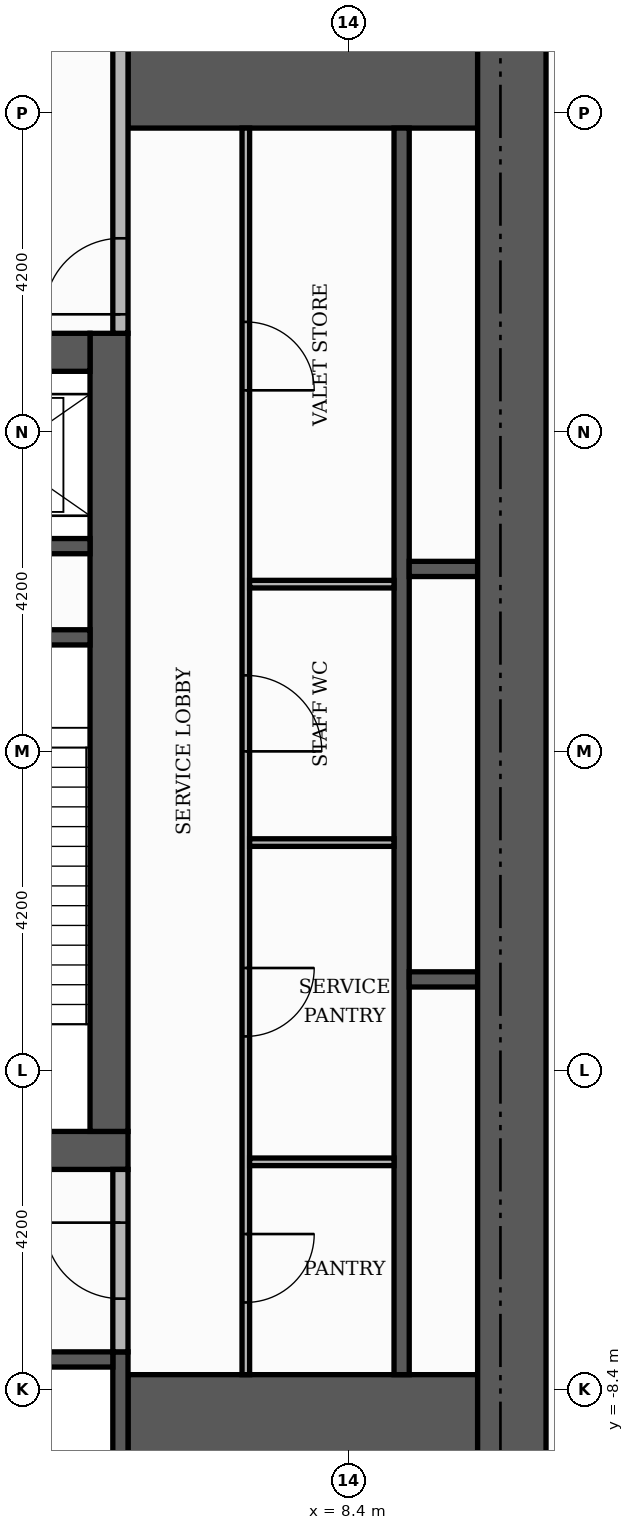
"""IFC4 building model, lengths in metres.
Left out: names, types, materials, properties, quantities, classifications, styles, units other than length and angle.
Written with IfcOpenShell. Run it as: python <this file> out.ifc"""

import sys

from ifc_helpers import new_model, si_unit, direction, frame, frame_2d, origin, place, context, subcontext, project, spatial, rectangle, extrude, element, fill, save


model = new_model("IFC4")
c1 = context("Model", 3, precision=1e-05, world=origin(), true_north=direction((0.0, 1.0)))
c2 = subcontext(c1, "Body", "Model", "MODEL_VIEW")
j1 = project(units=[si_unit("LENGTHUNIT", "METRE"), si_unit("PLANEANGLEUNIT", "RADIAN")], contexts=[c1])
p1 = place(None, origin())
s1 = spatial("IfcSite", under=j1, at=p1, CompositionType="ELEMENT")
p2 = place(p1, origin())
s2 = spatial("IfcBuilding", under=s1, at=p2, CompositionType="ELEMENT")
p3 = place(p2, frame((0.0, 0.0, 73.8)))
s3 = spatial("IfcBuildingStorey", under=s2, at=p3, CompositionType="ELEMENT", Elevation=73.8)
p4 = place(p3, frame((-5.5, -5.25, 0.0), z_axis=(0.0, 0.0, 1.0), x_axis=(1.0, 0.0, 0.0)))
e1 = element("IfcWall", 1, at=p4, inside=s3, PredefinedType="SHEAR", context=c2, shape_type="SweptSolid", body=[
    extrude(rectangle(XDim=11.0, YDim=0.5, at=frame_2d((5.5, 0.0))), origin(), (0.0, 0.0, 1.0), 4.98),
])
p5 = place(p4, frame((4.9, 0.0, 0.0)))
e2 = element("IfcOpeningElement", 2, at=p5, cuts=e1, PredefinedType="OPENING", context=c2, shape_type="SweptSolid", body=[
    extrude(rectangle(XDim=1.2, YDim=2.1, at=frame_2d((0.6, 1.05))), frame((0.0, 0.26, 0.0), z_axis=(0.0, -1.0, 0.0), x_axis=(1.0, 0.0, 0.0)), (0.0, 0.0, 1.0), 0.52),
])
p6 = place(p3, frame((5.25, -5.0, 0.0), z_axis=(0.0, 0.0, 1.0), x_axis=(0.0, 1.0, 0.0)))
e3 = element("IfcWall", 3, at=p6, inside=s3, PredefinedType="SHEAR", context=c2, shape_type="SweptSolid", body=[
    extrude(rectangle(XDim=10.5, YDim=0.5, at=frame_2d((5.25, 0.0))), origin(), (0.0, 0.0, 1.0), 4.98),
])
p7 = place(p3, frame((-5.0, 5.25, 0.0), z_axis=(0.0, 0.0, 1.0), x_axis=(1.0, 0.0, 0.0)))
e4 = element("IfcWall", 4, at=p7, inside=s3, PredefinedType="SHEAR", context=c2, shape_type="SweptSolid", body=[
    extrude(rectangle(XDim=10.0, YDim=0.5, at=frame_2d((5.0, 0.0))), origin(), (0.0, 0.0, 1.0), 4.98),
])
p8 = place(p7, frame((4.4, 0.0, 0.0)))
e5 = element("IfcOpeningElement", 5, at=p8, cuts=e4, PredefinedType="OPENING", context=c2, shape_type="SweptSolid", body=[
    extrude(rectangle(XDim=1.2, YDim=2.1, at=frame_2d((0.6, 1.05))), frame((0.0, 0.26, 0.0), z_axis=(0.0, -1.0, 0.0), x_axis=(1.0, 0.0, 0.0)), (0.0, 0.0, 1.0), 0.52),
])
for number, where, z_axis, x_axis in (
    (6, (5.5, -9.15, 0.0), (0.0, 0.0, 1.0), (1.0, 0.0, 0.0)),
    (7, (5.5, 9.15, 0.0), (0.0, 0.0, 1.0), (1.0, 0.0, 0.0)),
):
    element("IfcWall", number, at=place(p3, frame(where, z_axis=z_axis, x_axis=x_axis)), inside=s3, PredefinedType="SHEAR", context=c2, shape_type="SweptSolid", body=[
        extrude(rectangle(XDim=4.6, YDim=1.9, at=frame_2d((2.3, 0.0))), origin(), (0.0, 0.0, 1.0), 4.98),
    ])
p9 = place(p3, frame((2.15, 1.5, 0.0), z_axis=(0.0, 0.0, 1.0), x_axis=(1.0, 0.0, 0.0)))
e8 = element("IfcWall", 8, at=p9, inside=s3, PredefinedType="SHEAR", context=c2, shape_type="SweptSolid", body=[
    extrude(rectangle(XDim=2.85, YDim=0.2, at=frame_2d((1.425, 0.0))), origin(), (0.0, 0.0, 1.0), 4.98),
])
p10 = place(p3, frame((5.4, -10.1, 0.0), z_axis=(0.0, 0.0, 1.0), x_axis=(0.0, 1.0, 0.0)))
e9 = element("IfcWall", 9, at=p10, inside=s3, PredefinedType="SHEAR", context=c2, shape_type="SweptSolid", body=[
    extrude(rectangle(XDim=2.2, YDim=0.2, at=frame_2d((1.1, 0.0))), origin(), (0.0, 0.0, 1.0), 4.98),
])
p11 = place(p3, frame((9.1, -8.2, 0.0), z_axis=(0.0, 0.0, 1.0), x_axis=(0.0, 1.0, 0.0)))
e10 = element("IfcWall", 10, at=p11, inside=s3, PredefinedType="SHEAR", context=c2, shape_type="SweptSolid", body=[
    extrude(rectangle(XDim=16.4, YDim=0.2, at=frame_2d((8.2, 0.0))), origin(), (0.0, 0.0, 1.0), 4.98),
])
p12 = place(p3, frame((2.8, -8.0, 0.0), z_axis=(0.0, 0.0, 1.0), x_axis=(1.0, 0.0, 0.0)))
e11 = element("IfcWall", 11, at=p12, inside=s3, PredefinedType="SHEAR", context=c2, shape_type="SweptSolid", body=[
    extrude(rectangle(XDim=2.5, YDim=0.2, at=frame_2d((1.25, 0.0))), origin(), (0.0, 0.0, 1.0), 4.98),
])
for number, where, z_axis, x_axis in (
    (12, (9.2, -3.0, 0.0), (0.0, 0.0, 1.0), (1.0, 0.0, 0.0)),
    (13, (9.2, 2.4, 0.0), (0.0, 0.0, 1.0), (1.0, 0.0, 0.0)),
):
    element("IfcWall", number, at=place(p3, frame(where, z_axis=z_axis, x_axis=x_axis)), inside=s3, PredefinedType="SHEAR", context=c2, shape_type="SweptSolid", body=[
        extrude(rectangle(XDim=0.9, YDim=0.2, at=frame_2d((0.45, 0.0))), origin(), (0.0, 0.0, 1.0), 4.98),
    ])
p13 = place(p3, frame((2.15, 2.7, 0.0), z_axis=(0.0, 0.0, 1.0), x_axis=(1.0, 0.0, 0.0)))
e14 = element("IfcWall", 14, at=p13, inside=s3, PredefinedType="SHEAR", context=c2, shape_type="SweptSolid", body=[
    extrude(rectangle(XDim=2.85, YDim=0.2, at=frame_2d((1.425, 0.0))), origin(), (0.0, 0.0, 1.0), 4.98),
])
p14 = place(p3, frame((10.55, -10.1, 0.0), z_axis=(0.0, 0.0, 1.0), x_axis=(0.0, 1.0, 0.0)))
e15 = element("IfcWall", 15, at=p14, inside=s3, PredefinedType="SHEAR", context=c2, shape_type="SweptSolid", body=[
    extrude(rectangle(XDim=20.2, YDim=0.9, at=frame_2d((10.1, 0.0))), origin(), (0.0, 0.0, 1.0), 4.98),
])
p15 = place(p3, frame((7.05, -8.2, 0.0), z_axis=(0.0, 0.0, 1.0), x_axis=(0.0, 1.0, 0.0)))
e16 = element("IfcWall", 16, at=p15, inside=s3, PredefinedType="PARTITIONING", context=c2, shape_type="SweptSolid", body=[
    extrude(rectangle(XDim=16.4, YDim=0.1, at=frame_2d((8.2, 0.0))), origin(), (0.0, 0.0, 1.0), 4.98),
])
p16 = place(p15, frame((0.95, 0.0, 0.0)))
e17 = element("IfcOpeningElement", 17, at=p16, cuts=e16, PredefinedType="OPENING", context=c2, shape_type="SweptSolid", body=[
    extrude(rectangle(XDim=0.9, YDim=2.1, at=frame_2d((0.45, 1.05))), frame((0.0, 0.06, 0.0), z_axis=(0.0, -1.0, 0.0), x_axis=(1.0, 0.0, 0.0)), (0.0, 0.0, 1.0), 0.12),
])
p17 = place(p15, frame((4.45, 0.0, 0.0)))
e18 = element("IfcOpeningElement", 18, at=p17, cuts=e16, PredefinedType="OPENING", context=c2, shape_type="SweptSolid", body=[
    extrude(rectangle(XDim=0.9, YDim=2.1, at=frame_2d((0.45, 1.05))), frame((0.0, 0.06, 0.0), z_axis=(0.0, -1.0, 0.0), x_axis=(1.0, 0.0, 0.0)), (0.0, 0.0, 1.0), 0.12),
])
p18 = place(p15, frame((8.2, 0.0, 0.0)))
e19 = element("IfcOpeningElement", 19, at=p18, cuts=e16, PredefinedType="OPENING", context=c2, shape_type="SweptSolid", body=[
    extrude(rectangle(XDim=1.0, YDim=2.1, at=frame_2d((0.5, 1.05))), frame((0.0, 0.06, 0.0), z_axis=(0.0, -1.0, 0.0), x_axis=(1.0, 0.0, 0.0)), (0.0, 0.0, 1.0), 0.12),
])
p19 = place(p15, frame((12.95, 0.0, 0.0)))
e20 = element("IfcOpeningElement", 20, at=p19, cuts=e16, PredefinedType="OPENING", context=c2, shape_type="SweptSolid", body=[
    extrude(rectangle(XDim=0.9, YDim=2.1, at=frame_2d((0.45, 1.05))), frame((0.0, 0.06, 0.0), z_axis=(0.0, -1.0, 0.0), x_axis=(1.0, 0.0, 0.0)), (0.0, 0.0, 1.0), 0.12),
])
p20 = place(p3, frame((5.4, -7.9, 0.0), z_axis=(0.0, 0.0, 1.0), x_axis=(0.0, 1.0, 0.0)))
e21 = element("IfcWall", 21, at=p20, inside=s3, PredefinedType="PARTITIONING", context=c2, shape_type="SweptSolid", body=[
    extrude(rectangle(XDim=2.4, YDim=0.2, at=frame_2d((1.2, 0.0))), origin(), (0.0, 0.0, 1.0), 4.98),
])
p21 = place(p20, frame((0.7, 0.0, 0.0)))
e22 = element("IfcOpeningElement", 22, at=p21, cuts=e21, PredefinedType="OPENING", context=c2, shape_type="SweptSolid", body=[
    extrude(rectangle(XDim=1.0, YDim=2.1, at=frame_2d((0.5, 1.05))), frame((0.0, 0.11, 0.0), z_axis=(0.0, -1.0, 0.0), x_axis=(1.0, 0.0, 0.0)), (0.0, 0.0, 1.0), 0.22),
])
for number, where, z_axis, x_axis in (
    (23, (7.1, -5.4, 0.0), (0.0, 0.0, 1.0), (1.0, 0.0, 0.0)),
    (24, (7.1, -1.2, 0.0), (0.0, 0.0, 1.0), (1.0, 0.0, 0.0)),
    (25, (7.1, 2.2, 0.0), (0.0, 0.0, 1.0), (1.0, 0.0, 0.0)),
):
    element("IfcWall", number, at=place(p3, frame(where, z_axis=z_axis, x_axis=x_axis)), inside=s3, PredefinedType="PARTITIONING", context=c2, shape_type="SweptSolid", body=[
        extrude(rectangle(XDim=1.9, YDim=0.1, at=frame_2d((0.95, 0.0))), origin(), (0.0, 0.0, 1.0), 4.98),
    ])
p22 = place(p3, frame((5.4, 5.5, 0.0), z_axis=(0.0, 0.0, 1.0), x_axis=(0.0, 1.0, 0.0)))
e26 = element("IfcWall", 26, at=p22, inside=s3, PredefinedType="PARTITIONING", context=c2, shape_type="SweptSolid", body=[
    extrude(rectangle(XDim=4.6, YDim=0.2, at=frame_2d((2.3, 0.0))), origin(), (0.0, 0.0, 1.0), 4.98),
])
p23 = place(p22, frame((0.25, 0.0, 0.0)))
e27 = element("IfcOpeningElement", 27, at=p23, cuts=e26, PredefinedType="OPENING", context=c2, shape_type="SweptSolid", body=[
    extrude(rectangle(XDim=1.0, YDim=2.1, at=frame_2d((0.5, 1.05))), frame((0.0, 0.11, 0.0), z_axis=(0.0, -1.0, 0.0), x_axis=(1.0, 0.0, 0.0)), (0.0, 0.0, 1.0), 0.22),
])
p24 = place(p23, origin())
e28 = element("IfcDoor", 28, at=p24, inside=s3, OperationType="SINGLE_SWING_LEFT", PredefinedType="DOOR", context=c2, shape_type="SweptSolid", body=[
    extrude(rectangle(XDim=1.0, YDim=2.1, at=frame_2d((0.5, 1.05))), frame((0.0, 0.025, 0.0), z_axis=(0.0, -1.0, 0.0), x_axis=(1.0, 0.0, 0.0)), (0.0, 0.0, 1.0), 0.05),
])
fill(e27, e28)
p25 = place(p21, origin())
e29 = element("IfcDoor", 29, at=p25, inside=s3, OperationType="SINGLE_SWING_RIGHT", PredefinedType="DOOR", context=c2, shape_type="SweptSolid", body=[
    extrude(rectangle(XDim=1.0, YDim=2.1, at=frame_2d((0.5, 1.05))), frame((0.0, 0.025, 0.0), z_axis=(0.0, -1.0, 0.0), x_axis=(1.0, 0.0, 0.0)), (0.0, 0.0, 1.0), 0.05),
])
fill(e22, e29)
p26 = place(p16, frame((0.9, 0.0, 0.0), z_axis=(0.0, 0.0, 1.0), x_axis=(-1.0, 0.0, 0.0)))
e30 = element("IfcDoor", 30, at=p26, inside=s3, OperationType="SINGLE_SWING_RIGHT", PredefinedType="DOOR", context=c2, shape_type="SweptSolid", body=[
    extrude(rectangle(XDim=0.9, YDim=2.1, at=frame_2d((0.45, 1.05))), frame((0.0, 0.025, 0.0), z_axis=(0.0, -1.0, 0.0), x_axis=(1.0, 0.0, 0.0)), (0.0, 0.0, 1.0), 0.05),
])
fill(e17, e30)
p27 = place(p17, frame((0.9, 0.0, 0.0), z_axis=(0.0, 0.0, 1.0), x_axis=(-1.0, 0.0, 0.0)))
e31 = element("IfcDoor", 31, at=p27, inside=s3, OperationType="SINGLE_SWING_RIGHT", PredefinedType="DOOR", context=c2, shape_type="SweptSolid", body=[
    extrude(rectangle(XDim=0.9, YDim=2.1, at=frame_2d((0.45, 1.05))), frame((0.0, 0.025, 0.0), z_axis=(0.0, -1.0, 0.0), x_axis=(1.0, 0.0, 0.0)), (0.0, 0.0, 1.0), 0.05),
])
fill(e18, e31)
p28 = place(p18, frame((1.0, 0.0, 0.0), z_axis=(0.0, 0.0, 1.0), x_axis=(-1.0, 0.0, 0.0)))
e32 = element("IfcDoor", 32, at=p28, inside=s3, OperationType="SINGLE_SWING_LEFT", PredefinedType="DOOR", context=c2, shape_type="SweptSolid", body=[
    extrude(rectangle(XDim=1.0, YDim=2.1, at=frame_2d((0.5, 1.05))), frame((0.0, 0.025, 0.0), z_axis=(0.0, -1.0, 0.0), x_axis=(1.0, 0.0, 0.0)), (0.0, 0.0, 1.0), 0.05),
])
fill(e19, e32)
p29 = place(p19, frame((0.9, 0.0, 0.0), z_axis=(0.0, 0.0, 1.0), x_axis=(-1.0, 0.0, 0.0)))
e33 = element("IfcDoor", 33, at=p29, inside=s3, OperationType="SINGLE_SWING_LEFT", PredefinedType="DOOR", context=c2, shape_type="SweptSolid", body=[
    extrude(rectangle(XDim=0.9, YDim=2.1, at=frame_2d((0.45, 1.05))), frame((0.0, 0.025, 0.0), z_axis=(0.0, -1.0, 0.0), x_axis=(1.0, 0.0, 0.0)), (0.0, 0.0, 1.0), 0.05),
])
fill(e20, e33)
save(model, sys.argv[1])
